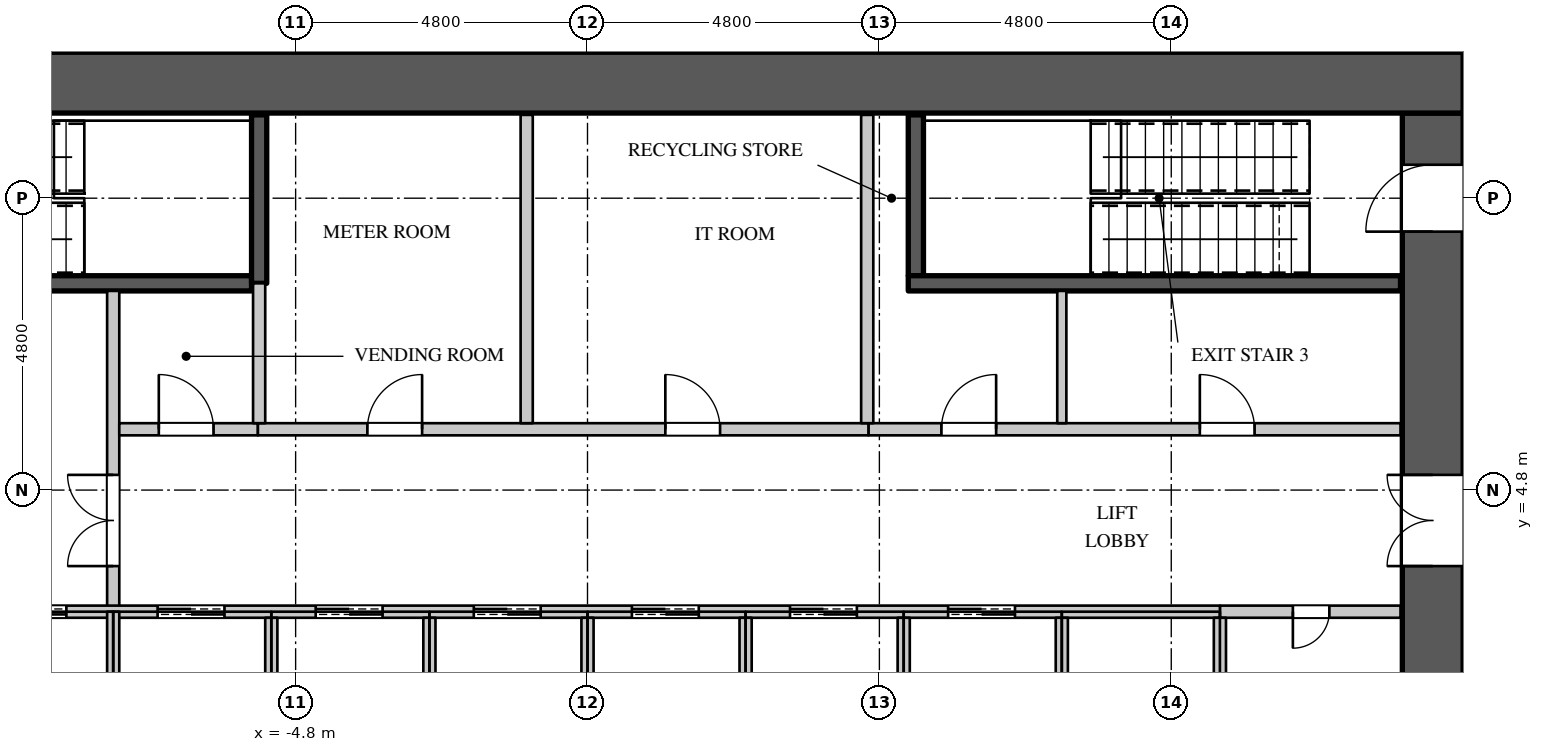
"""IFC4 building model, lengths in metres.
Left out: names, types, materials, properties, quantities, classifications, styles, units other than length and angle.
Written with IfcOpenShell. Run it as: python <this file> out.ifc"""

import sys

from ifc_helpers import new_model, si_unit, direction, frame, frame_2d, origin, place, context, subcontext, project, spatial, rectangle, extrude, element, fill, save


model = new_model("IFC4")
c1 = context("Model", 3, precision=1e-05, world=origin(), true_north=direction((0.0, 1.0)))
c2 = subcontext(c1, "Body", "Model", "MODEL_VIEW")
j1 = project(units=[si_unit("LENGTHUNIT", "METRE"), si_unit("PLANEANGLEUNIT", "RADIAN")], contexts=[c1])
p1 = place(None, origin())
s1 = spatial("IfcSite", under=j1, at=p1, CompositionType="ELEMENT")
p2 = place(p1, origin())
s2 = spatial("IfcBuilding", under=s1, at=p2, CompositionType="ELEMENT")
p3 = place(p2, frame((0.0, 0.0, 80.1)))
s3 = spatial("IfcBuildingStorey", under=s2, at=p3, CompositionType="ELEMENT", Elevation=80.1)
p4 = place(p3, frame((-14.4, 11.5, 0.0), z_axis=(0.0, 0.0, 1.0), x_axis=(1.0, 0.0, 0.0)))
e1 = element("IfcWall", 1, at=p4, inside=s3, PredefinedType="SHEAR", context=c2, shape_type="SweptSolid", body=[
    extrude(rectangle(XDim=28.8, YDim=1.0, at=frame_2d((14.4, 0.0))), origin(), (0.0, 0.0, 1.0), 4.2),
])
p5 = place(p3, frame((13.9, -11.0, 0.0), z_axis=(0.0, 0.0, 1.0), x_axis=(0.0, 1.0, 0.0)))
e2 = element("IfcWall", 2, at=p5, inside=s3, PredefinedType="SHEAR", context=c2, shape_type="SweptSolid", body=[
    extrude(rectangle(XDim=22.0, YDim=1.0, at=frame_2d((11.0, 0.0))), origin(), (0.0, 0.0, 1.0), 4.2),
])
p6 = place(p5, frame((20.05, 0.0, 0.0)))
e3 = element("IfcOpeningElement", 3, at=p6, cuts=e2, PredefinedType="OPENING", context=c2, shape_type="SweptSolid", body=[
    extrude(rectangle(XDim=1.1, YDim=2.2, at=frame_2d((0.55, 1.1))), frame((0.0, 0.51, 0.0), z_axis=(0.0, -1.0, 0.0), x_axis=(1.0, 0.0, 0.0)), (0.0, 0.0, 1.0), 1.02),
])
p7 = place(p5, frame((0.85, 0.0, 0.0)))
e4 = element("IfcOpeningElement", 4, at=p7, cuts=e2, PredefinedType="OPENING", context=c2, shape_type="SweptSolid", body=[
    extrude(rectangle(XDim=1.1, YDim=2.2, at=frame_2d((0.55, 1.1))), frame((0.0, 0.51, 0.0), z_axis=(0.0, -1.0, 0.0), x_axis=(1.0, 0.0, 0.0)), (0.0, 0.0, 1.0), 1.02),
])
p8 = place(p5, frame((14.55, 0.0, 0.0)))
e5 = element("IfcOpeningElement", 5, at=p8, cuts=e2, PredefinedType="OPENING", context=c2, shape_type="SweptSolid", body=[
    extrude(rectangle(XDim=1.5, YDim=2.4, at=frame_2d((0.75, 1.2))), frame((0.0, 0.51, 0.0), z_axis=(0.0, -1.0, 0.0), x_axis=(1.0, 0.0, 0.0)), (0.0, 0.0, 1.0), 1.02),
])
p9 = place(p5, frame((5.95, 0.0, 0.0)))
e6 = element("IfcOpeningElement", 6, at=p9, cuts=e2, PredefinedType="OPENING", context=c2, shape_type="SweptSolid", body=[
    extrude(rectangle(XDim=1.5, YDim=2.4, at=frame_2d((0.75, 1.2))), frame((0.0, 0.51, 0.0), z_axis=(0.0, -1.0, 0.0), x_axis=(1.0, 0.0, 0.0)), (0.0, 0.0, 1.0), 1.02),
])
p10 = place(p3, frame((-7.8, 2.8, 0.0), z_axis=(0.0, 0.0, 1.0), x_axis=(0.0, 1.0, 0.0)))
e7 = element("IfcWall", 7, at=p10, inside=s3, PredefinedType="PARTITIONING", context=c2, shape_type="SweptSolid", body=[
    extrude(rectangle(XDim=5.275, YDim=0.2, at=frame_2d((2.637, 0.0))), origin(), (0.0, 0.0, 1.0), 3.95),
])
p11 = place(p10, frame((0.75, 0.0, 0.0)))
e8 = element("IfcOpeningElement", 8, at=p11, cuts=e7, PredefinedType="OPENING", context=c2, shape_type="SweptSolid", body=[
    extrude(rectangle(XDim=1.5, YDim=2.4, at=frame_2d((0.75, 1.2))), frame((0.0, 0.11, 0.0), z_axis=(0.0, -1.0, 0.0), x_axis=(1.0, 0.0, 0.0)), (0.0, 0.0, 1.0), 0.22),
])
p12 = place(p3, frame((-7.7, 5.8, 0.0), z_axis=(0.0, 0.0, 1.0), x_axis=(1.0, 0.0, 0.0)))
e9 = element("IfcWall", 9, at=p12, inside=s3, PredefinedType="PARTITIONING", context=c2, shape_type="SweptSolid", body=[
    extrude(rectangle(XDim=2.28, YDim=0.2, at=frame_2d((1.14, 0.0))), origin(), (0.0, 0.0, 1.0), 3.95),
])
p13 = place(p12, frame((0.65, 0.0, 0.0)))
e10 = element("IfcOpeningElement", 10, at=p13, cuts=e9, PredefinedType="OPENING", context=c2, shape_type="SweptSolid", body=[
    extrude(rectangle(XDim=0.9, YDim=2.2, at=frame_2d((0.45, 1.1))), frame((0.0, 0.11, 0.0), z_axis=(0.0, -1.0, 0.0), x_axis=(1.0, 0.0, 0.0)), (0.0, 0.0, 1.0), 0.22),
])
p14 = place(p3, frame((4.62, 5.8, 0.0), z_axis=(0.0, 0.0, 1.0), x_axis=(1.0, 0.0, 0.0)))
e11 = element("IfcWall", 11, at=p14, inside=s3, PredefinedType="PARTITIONING", context=c2, shape_type="SweptSolid", body=[
    extrude(rectangle(XDim=8.75, YDim=0.2, at=frame_2d((4.375, 0.0))), origin(), (0.0, 0.0, 1.0), 3.95),
])
p15 = place(p14, frame((1.2, 0.0, 0.0)))
e12 = element("IfcOpeningElement", 12, at=p15, cuts=e11, PredefinedType="OPENING", context=c2, shape_type="SweptSolid", body=[
    extrude(rectangle(XDim=0.9, YDim=2.2, at=frame_2d((0.45, 1.1))), frame((0.0, 0.11, 0.0), z_axis=(0.0, -1.0, 0.0), x_axis=(1.0, 0.0, 0.0)), (0.0, 0.0, 1.0), 0.22),
])
p16 = place(p14, frame((5.45, 0.0, 0.0)))
e13 = element("IfcOpeningElement", 13, at=p16, cuts=e11, PredefinedType="OPENING", context=c2, shape_type="SweptSolid", body=[
    extrude(rectangle(XDim=0.9, YDim=2.2, at=frame_2d((0.45, 1.1))), frame((0.0, 0.11, 0.0), z_axis=(0.0, -1.0, 0.0), x_axis=(1.0, 0.0, 0.0)), (0.0, 0.0, 1.0), 0.22),
])
p17 = place(p3, frame((7.8, 5.9, 0.0), z_axis=(0.0, 0.0, 1.0), x_axis=(0.0, 1.0, 0.0)))
e14 = element("IfcWall", 14, at=p17, inside=s3, PredefinedType="PARTITIONING", context=c2, shape_type="SweptSolid", body=[
    extrude(rectangle(XDim=2.175, YDim=0.15, at=frame_2d((1.087, 0.0))), origin(), (0.0, 0.0, 1.0), 3.95),
])
p18 = place(p3, frame((-5.42, 5.8, 0.0), z_axis=(0.0, 0.0, 1.0), x_axis=(1.0, 0.0, 0.0)))
e15 = element("IfcWall", 15, at=p18, inside=s3, PredefinedType="PARTITIONING", context=c2, shape_type="SweptSolid", body=[
    extrude(rectangle(XDim=10.04, YDim=0.2, at=frame_2d((5.02, 0.0))), origin(), (0.0, 0.0, 1.0), 3.95),
])
p19 = place(p18, frame((1.8, 0.0, 0.0)))
e16 = element("IfcOpeningElement", 16, at=p19, cuts=e15, PredefinedType="OPENING", context=c2, shape_type="SweptSolid", body=[
    extrude(rectangle(XDim=0.9, YDim=2.2, at=frame_2d((0.45, 1.1))), frame((0.0, 0.11, 0.0), z_axis=(0.0, -1.0, 0.0), x_axis=(1.0, 0.0, 0.0)), (0.0, 0.0, 1.0), 0.22),
])
p20 = place(p18, frame((6.7, 0.0, 0.0)))
e17 = element("IfcOpeningElement", 17, at=p20, cuts=e15, PredefinedType="OPENING", context=c2, shape_type="SweptSolid", body=[
    extrude(rectangle(XDim=0.9, YDim=2.2, at=frame_2d((0.45, 1.1))), frame((0.0, 0.11, 0.0), z_axis=(0.0, -1.0, 0.0), x_axis=(1.0, 0.0, 0.0)), (0.0, 0.0, 1.0), 0.22),
])
p21 = place(p3, frame((-5.4, 5.9, 0.0), z_axis=(0.0, 0.0, 1.0), x_axis=(0.0, 1.0, 0.0)))
e18 = element("IfcWall", 18, at=p21, inside=s3, PredefinedType="PARTITIONING", context=c2, shape_type="SweptSolid", body=[
    extrude(rectangle(XDim=2.3, YDim=0.2, at=frame_2d((1.15, 0.0))), origin(), (0.0, 0.0, 1.0), 3.95),
])
for number, where, z_axis, x_axis in (
    (19, (-1.0, 5.9, 0.0), (0.0, 0.0, 1.0), (0.0, 1.0, 0.0)),
    (20, (4.6, 5.9, 0.0), (0.0, 0.0, 1.0), (0.0, 1.0, 0.0)),
):
    element("IfcWall", number, at=place(p3, frame(where, z_axis=z_axis, x_axis=x_axis)), inside=s3, PredefinedType="PARTITIONING", context=c2, shape_type="SweptSolid", body=[
        extrude(rectangle(XDim=5.07, YDim=0.2, at=frame_2d((2.535, 0.0))), origin(), (0.0, 0.0, 1.0), 3.95),
    ])
p22 = place(p3, frame((10.4, 2.8, 0.0), z_axis=(0.0, 0.0, 1.0), x_axis=(1.0, 0.0, 0.0)))
e21 = element("IfcWall", 21, at=p22, inside=s3, PredefinedType="PARTITIONING", context=c2, shape_type="SweptSolid", body=[
    extrude(rectangle(XDim=2.97, YDim=0.2, at=frame_2d((1.485, 0.0))), origin(), (0.0, 0.0, 1.0), 3.95),
])
p23 = place(p22, frame((1.2, 0.0, 0.0)))
e22 = element("IfcOpeningElement", 22, at=p23, cuts=e21, PredefinedType="OPENING", context=c2, shape_type="SweptSolid", body=[
    extrude(rectangle(XDim=0.6, YDim=2.0, at=frame_2d((0.3, 1.0))), frame((0.0, 0.11, 0.0), z_axis=(0.0, -1.0, 0.0), x_axis=(1.0, 0.0, 0.0)), (0.0, 0.0, 1.0), 0.22),
])
p24 = place(p3, frame((-13.37, 2.8, 0.0), z_axis=(0.0, 0.0, 1.0), x_axis=(1.0, 0.0, 0.0)))
e23 = element("IfcWall", 23, at=p24, inside=s3, PredefinedType="PARTITIONING", context=c2, shape_type="SweptSolid", body=[
    extrude(rectangle(XDim=23.77, YDim=0.2, at=frame_2d((11.885, 0.0))), origin(), (0.0, 0.0, 1.0), 3.95),
])
p25 = place(p24, frame((0.9, 0.0, 0.0)))
e24 = element("IfcOpeningElement", 24, at=p25, cuts=e23, PredefinedType="OPENING", context=c2, shape_type="SweptSolid", body=[
    extrude(rectangle(XDim=1.1, YDim=2.2, at=frame_2d((0.55, 1.1))), frame((0.0, 0.11, 0.0), z_axis=(0.0, -1.0, 0.0), x_axis=(1.0, 0.0, 0.0)), (0.0, 0.0, 1.0), 0.22),
])
p26 = place(p24, frame((3.7, 0.0, 0.0)))
e25 = element("IfcOpeningElement", 25, at=p26, cuts=e23, PredefinedType="OPENING", context=c2, shape_type="SweptSolid", body=[
    extrude(rectangle(XDim=1.1, YDim=2.2, at=frame_2d((0.55, 1.1))), frame((0.0, 0.11, 0.0), z_axis=(0.0, -1.0, 0.0), x_axis=(1.0, 0.0, 0.0)), (0.0, 0.0, 1.0), 0.22),
])
p27 = place(p24, frame((6.3, 0.0, 0.0)))
e26 = element("IfcOpeningElement", 26, at=p27, cuts=e23, PredefinedType="OPENING", context=c2, shape_type="SweptSolid", body=[
    extrude(rectangle(XDim=1.1, YDim=2.2, at=frame_2d((0.55, 1.1))), frame((0.0, 0.11, 0.0), z_axis=(0.0, -1.0, 0.0), x_axis=(1.0, 0.0, 0.0)), (0.0, 0.0, 1.0), 0.22),
])
p28 = place(p24, frame((8.9, 0.0, 0.0)))
e27 = element("IfcOpeningElement", 27, at=p28, cuts=e23, PredefinedType="OPENING", context=c2, shape_type="SweptSolid", body=[
    extrude(rectangle(XDim=1.1, YDim=2.2, at=frame_2d((0.55, 1.1))), frame((0.0, 0.11, 0.0), z_axis=(0.0, -1.0, 0.0), x_axis=(1.0, 0.0, 0.0)), (0.0, 0.0, 1.0), 0.22),
])
p29 = place(p24, frame((11.5, 0.0, 0.0)))
e28 = element("IfcOpeningElement", 28, at=p29, cuts=e23, PredefinedType="OPENING", context=c2, shape_type="SweptSolid", body=[
    extrude(rectangle(XDim=1.1, YDim=2.2, at=frame_2d((0.55, 1.1))), frame((0.0, 0.11, 0.0), z_axis=(0.0, -1.0, 0.0), x_axis=(1.0, 0.0, 0.0)), (0.0, 0.0, 1.0), 0.22),
])
p30 = place(p24, frame((14.1, 0.0, 0.0)))
e29 = element("IfcOpeningElement", 29, at=p30, cuts=e23, PredefinedType="OPENING", context=c2, shape_type="SweptSolid", body=[
    extrude(rectangle(XDim=1.1, YDim=2.2, at=frame_2d((0.55, 1.1))), frame((0.0, 0.11, 0.0), z_axis=(0.0, -1.0, 0.0), x_axis=(1.0, 0.0, 0.0)), (0.0, 0.0, 1.0), 0.22),
])
p31 = place(p24, frame((16.7, 0.0, 0.0)))
e30 = element("IfcOpeningElement", 30, at=p31, cuts=e23, PredefinedType="OPENING", context=c2, shape_type="SweptSolid", body=[
    extrude(rectangle(XDim=1.1, YDim=2.2, at=frame_2d((0.55, 1.1))), frame((0.0, 0.11, 0.0), z_axis=(0.0, -1.0, 0.0), x_axis=(1.0, 0.0, 0.0)), (0.0, 0.0, 1.0), 0.22),
])
p32 = place(p24, frame((19.3, 0.0, 0.0)))
e31 = element("IfcOpeningElement", 31, at=p32, cuts=e23, PredefinedType="OPENING", context=c2, shape_type="SweptSolid", body=[
    extrude(rectangle(XDim=1.1, YDim=2.2, at=frame_2d((0.55, 1.1))), frame((0.0, 0.11, 0.0), z_axis=(0.0, -1.0, 0.0), x_axis=(1.0, 0.0, 0.0)), (0.0, 0.0, 1.0), 0.22),
])
p33 = place(p3, frame((-7.8, 0.0, 0.0), z_axis=(0.0, 0.0, 1.0), x_axis=(0.0, 1.0, 0.0)))
e32 = element("IfcWall", 32, at=p33, inside=s3, PredefinedType="PARTITIONING", context=c2, shape_type="SweptSolid", body=[
    extrude(rectangle(XDim=2.8, YDim=0.2, at=frame_2d((1.4, 0.0))), origin(), (0.0, 0.0, 1.0), 3.95),
])
for number, where, z_axis, x_axis in (
    (33, (-5.2, 0.1, 0.0), (0.0, 0.0, 1.0), (0.0, 1.0, 0.0)),
    (34, (-2.6, 0.1, 0.0), (0.0, 0.0, 1.0), (0.0, 1.0, 0.0)),
    (35, (0.0, 0.1, 0.0), (0.0, 0.0, 1.0), (0.0, 1.0, 0.0)),
    (36, (2.6, 0.1, 0.0), (0.0, 0.0, 1.0), (0.0, 1.0, 0.0)),
    (37, (5.2, 0.1, 0.0), (0.0, 0.0, 1.0), (0.0, 1.0, 0.0)),
):
    element("IfcWall", number, at=place(p3, frame(where, z_axis=z_axis, x_axis=x_axis)), inside=s3, PredefinedType="PARTITIONING", context=c2, shape_type="SweptSolid", body=[
        extrude(rectangle(XDim=2.6, YDim=0.2, at=frame_2d((1.3, 0.0))), origin(), (0.0, 0.0, 1.0), 3.95),
    ])
p34 = place(p3, frame((7.8, 0.0, 0.0), z_axis=(0.0, 0.0, 1.0), x_axis=(0.0, 1.0, 0.0)))
e38 = element("IfcWall", 38, at=p34, inside=s3, PredefinedType="PARTITIONING", context=c2, shape_type="SweptSolid", body=[
    extrude(rectangle(XDim=2.7, YDim=0.2, at=frame_2d((1.35, 0.0))), origin(), (0.0, 0.0, 1.0), 3.95),
])
p35 = place(p3, frame((10.4, -2.7, 0.0), z_axis=(0.0, 0.0, 1.0), x_axis=(0.0, 1.0, 0.0)))
e39 = element("IfcWall", 39, at=p35, inside=s3, PredefinedType="PARTITIONING", context=c2, shape_type="SweptSolid", body=[
    extrude(rectangle(XDim=5.4, YDim=0.2, at=frame_2d((2.7, 0.0))), origin(), (0.0, 0.0, 1.0), 3.95),
])
p36 = place(p3, frame((-13.37, 8.2, 0.0), z_axis=(0.0, 0.0, 1.0), x_axis=(1.0, 0.0, 0.0)))
e40 = element("IfcWall", 40, at=p36, inside=s3, PredefinedType="SHEAR", context=c2, shape_type="SweptSolid", body=[
    extrude(rectangle(XDim=7.845, YDim=0.25, at=frame_2d((3.923, 0.0))), origin(), (0.0, 0.0, 1.0), 3.95),
])
p37 = place(p36, frame((0.15, 0.0, 0.0)))
e41 = element("IfcOpeningElement", 41, at=p37, cuts=e40, PredefinedType="OPENING", context=c2, shape_type="SweptSolid", body=[
    extrude(rectangle(XDim=1.1, YDim=2.2, at=frame_2d((0.55, 1.1))), frame((0.0, 0.135, 0.0), z_axis=(0.0, -1.0, 0.0), x_axis=(1.0, 0.0, 0.0)), (0.0, 0.0, 1.0), 0.27),
])
p38 = place(p3, frame((-5.4, 8.2, 0.0), z_axis=(0.0, 0.0, 1.0), x_axis=(0.0, 1.0, 0.0)))
e42 = element("IfcWall", 42, at=p38, inside=s3, PredefinedType="SHEAR", context=c2, shape_type="SweptSolid", body=[
    extrude(rectangle(XDim=2.77, YDim=0.25, at=frame_2d((1.385, 0.0))), origin(), (0.0, 0.0, 1.0), 3.95),
])
p39 = place(p3, frame((5.4, 8.325, 0.0), z_axis=(0.0, 0.0, 1.0), x_axis=(0.0, 1.0, 0.0)))
e43 = element("IfcWall", 43, at=p39, inside=s3, PredefinedType="SHEAR", context=c2, shape_type="SweptSolid", body=[
    extrude(rectangle(XDim=2.645, YDim=0.25, at=frame_2d((1.323, 0.0))), origin(), (0.0, 0.0, 1.0), 3.95),
])
p40 = place(p3, frame((5.275, 8.2, 0.0), z_axis=(0.0, 0.0, 1.0), x_axis=(1.0, 0.0, 0.0)))
e44 = element("IfcWall", 44, at=p40, inside=s3, PredefinedType="SHEAR", context=c2, shape_type="SweptSolid", body=[
    extrude(rectangle(XDim=8.095, YDim=0.25, at=frame_2d((4.048, 0.0))), origin(), (0.0, 0.0, 1.0), 3.95),
])
p41 = place(p23, origin())
e45 = element("IfcDoor", 45, at=p41, inside=s3, OperationType="SINGLE_SWING_RIGHT", PredefinedType="DOOR", context=c2, shape_type="SweptSolid", body=[
    extrude(rectangle(XDim=0.6, YDim=2.0, at=frame_2d((0.3, 1.0))), frame((0.0, 0.025, 0.0), z_axis=(0.0, -1.0, 0.0), x_axis=(1.0, 0.0, 0.0)), (0.0, 0.0, 1.0), 0.05),
])
fill(e22, e45)
p42 = place(p13, origin())
e46 = element("IfcDoor", 46, at=p42, inside=s3, OperationType="SINGLE_SWING_LEFT", PredefinedType="DOOR", context=c2, shape_type="SweptSolid", body=[
    extrude(rectangle(XDim=0.9, YDim=2.2, at=frame_2d((0.45, 1.1))), frame((0.0, 0.025, 0.0), z_axis=(0.0, -1.0, 0.0), x_axis=(1.0, 0.0, 0.0)), (0.0, 0.0, 1.0), 0.05),
])
fill(e10, e46)
p43 = place(p19, origin())
e47 = element("IfcDoor", 47, at=p43, inside=s3, OperationType="SINGLE_SWING_RIGHT", PredefinedType="DOOR", context=c2, shape_type="SweptSolid", body=[
    extrude(rectangle(XDim=0.9, YDim=2.2, at=frame_2d((0.45, 1.1))), frame((0.0, 0.025, 0.0), z_axis=(0.0, -1.0, 0.0), x_axis=(1.0, 0.0, 0.0)), (0.0, 0.0, 1.0), 0.05),
])
fill(e16, e47)
p44 = place(p20, origin())
e48 = element("IfcDoor", 48, at=p44, inside=s3, OperationType="SINGLE_SWING_LEFT", PredefinedType="DOOR", context=c2, shape_type="SweptSolid", body=[
    extrude(rectangle(XDim=0.9, YDim=2.2, at=frame_2d((0.45, 1.1))), frame((0.0, 0.025, 0.0), z_axis=(0.0, -1.0, 0.0), x_axis=(1.0, 0.0, 0.0)), (0.0, 0.0, 1.0), 0.05),
])
fill(e17, e48)
p45 = place(p15, origin())
e49 = element("IfcDoor", 49, at=p45, inside=s3, OperationType="SINGLE_SWING_RIGHT", PredefinedType="DOOR", context=c2, shape_type="SweptSolid", body=[
    extrude(rectangle(XDim=0.9, YDim=2.2, at=frame_2d((0.45, 1.1))), frame((0.0, 0.025, 0.0), z_axis=(0.0, -1.0, 0.0), x_axis=(1.0, 0.0, 0.0)), (0.0, 0.0, 1.0), 0.05),
])
fill(e12, e49)
p46 = place(p16, origin())
e50 = element("IfcDoor", 50, at=p46, inside=s3, OperationType="SINGLE_SWING_LEFT", PredefinedType="DOOR", context=c2, shape_type="SweptSolid", body=[
    extrude(rectangle(XDim=0.9, YDim=2.2, at=frame_2d((0.45, 1.1))), frame((0.0, 0.025, 0.0), z_axis=(0.0, -1.0, 0.0), x_axis=(1.0, 0.0, 0.0)), (0.0, 0.0, 1.0), 0.05),
])
fill(e13, e50)
p47 = place(p26, origin())
e51 = element("IfcDoor", 51, at=p47, inside=s3, OperationType="DOUBLE_DOOR_SLIDING", PredefinedType="DOOR", context=c2, shape_type="SweptSolid", body=[
    extrude(rectangle(XDim=1.1, YDim=2.2, at=frame_2d((0.55, 1.1))), frame((0.0, 0.025, 0.0), z_axis=(0.0, -1.0, 0.0), x_axis=(1.0, 0.0, 0.0)), (0.0, 0.0, 1.0), 0.05),
])
fill(e25, e51)
p48 = place(p27, origin())
e52 = element("IfcDoor", 52, at=p48, inside=s3, OperationType="DOUBLE_DOOR_SLIDING", PredefinedType="DOOR", context=c2, shape_type="SweptSolid", body=[
    extrude(rectangle(XDim=1.1, YDim=2.2, at=frame_2d((0.55, 1.1))), frame((0.0, 0.025, 0.0), z_axis=(0.0, -1.0, 0.0), x_axis=(1.0, 0.0, 0.0)), (0.0, 0.0, 1.0), 0.05),
])
fill(e26, e52)
p49 = place(p28, origin())
e53 = element("IfcDoor", 53, at=p49, inside=s3, OperationType="DOUBLE_DOOR_SLIDING", PredefinedType="DOOR", context=c2, shape_type="SweptSolid", body=[
    extrude(rectangle(XDim=1.1, YDim=2.2, at=frame_2d((0.55, 1.1))), frame((0.0, 0.025, 0.0), z_axis=(0.0, -1.0, 0.0), x_axis=(1.0, 0.0, 0.0)), (0.0, 0.0, 1.0), 0.05),
])
fill(e27, e53)
p50 = place(p29, origin())
e54 = element("IfcDoor", 54, at=p50, inside=s3, OperationType="DOUBLE_DOOR_SLIDING", PredefinedType="DOOR", context=c2, shape_type="SweptSolid", body=[
    extrude(rectangle(XDim=1.1, YDim=2.2, at=frame_2d((0.55, 1.1))), frame((0.0, 0.025, 0.0), z_axis=(0.0, -1.0, 0.0), x_axis=(1.0, 0.0, 0.0)), (0.0, 0.0, 1.0), 0.05),
])
fill(e28, e54)
p51 = place(p30, origin())
e55 = element("IfcDoor", 55, at=p51, inside=s3, OperationType="DOUBLE_DOOR_SLIDING", PredefinedType="DOOR", context=c2, shape_type="SweptSolid", body=[
    extrude(rectangle(XDim=1.1, YDim=2.2, at=frame_2d((0.55, 1.1))), frame((0.0, 0.025, 0.0), z_axis=(0.0, -1.0, 0.0), x_axis=(1.0, 0.0, 0.0)), (0.0, 0.0, 1.0), 0.05),
])
fill(e29, e55)
p52 = place(p31, origin())
e56 = element("IfcDoor", 56, at=p52, inside=s3, OperationType="DOUBLE_DOOR_SLIDING", PredefinedType="DOOR", context=c2, shape_type="SweptSolid", body=[
    extrude(rectangle(XDim=1.1, YDim=2.2, at=frame_2d((0.55, 1.1))), frame((0.0, 0.025, 0.0), z_axis=(0.0, -1.0, 0.0), x_axis=(1.0, 0.0, 0.0)), (0.0, 0.0, 1.0), 0.05),
])
fill(e30, e56)
p53 = place(p32, origin())
e57 = element("IfcDoor", 57, at=p53, inside=s3, OperationType="DOUBLE_DOOR_SLIDING", PredefinedType="DOOR", context=c2, shape_type="SweptSolid", body=[
    extrude(rectangle(XDim=1.1, YDim=2.2, at=frame_2d((0.55, 1.1))), frame((0.0, 0.025, 0.0), z_axis=(0.0, -1.0, 0.0), x_axis=(1.0, 0.0, 0.0)), (0.0, 0.0, 1.0), 0.05),
])
fill(e31, e57)
p54 = place(p11, origin())
e58 = element("IfcDoor", 58, at=p54, inside=s3, OperationType="DOUBLE_DOOR_SINGLE_SWING", PredefinedType="DOOR", context=c2, shape_type="SweptSolid", body=[
    extrude(rectangle(XDim=1.5, YDim=2.4, at=frame_2d((0.75, 1.2))), frame((0.0, 0.025, 0.0), z_axis=(0.0, -1.0, 0.0), x_axis=(1.0, 0.0, 0.0)), (0.0, 0.0, 1.0), 0.05),
])
fill(e8, e58)
p55 = place(p6, origin())
e59 = element("IfcDoor", 59, at=p55, inside=s3, OperationType="SINGLE_SWING_LEFT", PredefinedType="DOOR", context=c2, shape_type="SweptSolid", body=[
    extrude(rectangle(XDim=1.1, YDim=2.2, at=frame_2d((0.55, 1.1))), frame((0.0, 0.495, 0.0), z_axis=(0.0, -1.0, 0.0), x_axis=(1.0, 0.0, 0.0)), (0.0, 0.0, 1.0), 0.05),
])
fill(e3, e59)
p56 = place(p8, origin())
e60 = element("IfcDoor", 60, at=p56, inside=s3, OperationType="DOUBLE_DOOR_SINGLE_SWING", PredefinedType="DOOR", context=c2, shape_type="SweptSolid", body=[
    extrude(rectangle(XDim=1.5, YDim=2.4, at=frame_2d((0.75, 1.2))), frame((0.0, 0.495, 0.0), z_axis=(0.0, -1.0, 0.0), x_axis=(1.0, 0.0, 0.0)), (0.0, 0.0, 1.0), 0.05),
])
fill(e5, e60)
save(model, sys.argv[1])
